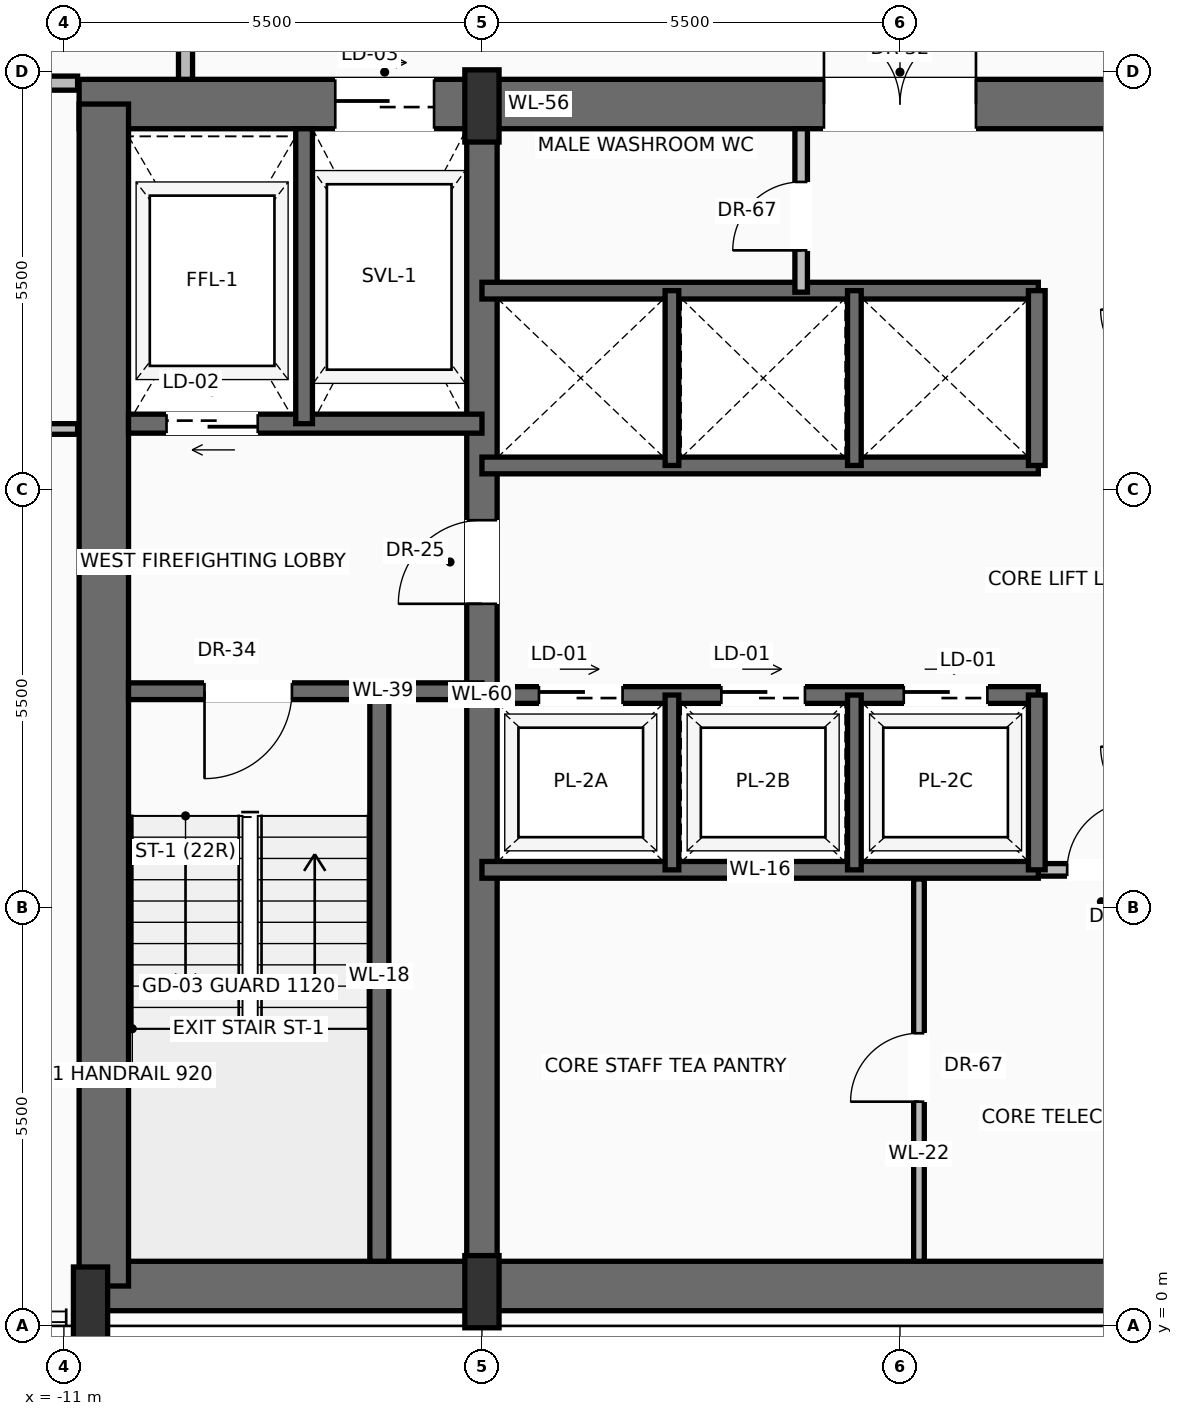
"""IFC4 building model, lengths in metres.
Left out: names, types, materials, properties, quantities, classifications, styles, units other than length and angle.
Written with IfcOpenShell. Run it as: python <this file> out.ifc"""

import sys

from ifc_helpers import new_model, si_unit, direction, frame, frame_2d, origin, origin_2d, place, context, subcontext, project, spatial, rectangle, extrude, source, transform, mapped, element, fill, save


model = new_model("IFC4")
c1 = context("Model", 3, precision=1e-05, world=origin(), true_north=direction((0.0, 1.0)))
c2 = subcontext(c1, "Body", "Model", "MODEL_VIEW")
j1 = project(units=[si_unit("LENGTHUNIT", "METRE"), si_unit("PLANEANGLEUNIT", "RADIAN")], contexts=[c1])
p1 = place(None, origin())
s1 = spatial("IfcSite", under=j1, at=p1, CompositionType="ELEMENT")
p2 = place(p1, origin())
s2 = spatial("IfcBuilding", under=s1, at=p2, CompositionType="ELEMENT")
p3 = place(p2, frame((0.0, 0.0, 140.4)))
s3 = spatial("IfcBuildingStorey", under=s2, at=p3, CompositionType="ELEMENT", Elevation=140.4)
p4 = place(p3, frame((-10.65, 0.525, 0.0), z_axis=(0.0, 0.0, 1.0), x_axis=(1.0, 0.0, 0.0)))
e1 = element("IfcWall", 1, at=p4, inside=s3, PredefinedType="SHEAR", context=c2, shape_type="SweptSolid", body=[
    extrude(rectangle(XDim=21.3, YDim=0.65, at=frame_2d((10.65, 0.0))), origin(), (0.0, 0.0, 1.0), 3.47),
])
p5 = place(p3, frame((-10.8, 16.075, 0.0), z_axis=(0.0, 0.0, 1.0), x_axis=(1.0, 0.0, 0.0)))
e2 = element("IfcWall", 2, at=p5, inside=s3, PredefinedType="SHEAR", context=c2, shape_type="SweptSolid", body=[
    extrude(rectangle(XDim=21.6, YDim=0.65, at=frame_2d((10.8, 0.0))), origin(), (0.0, 0.0, 1.0), 3.47),
])
p6 = place(p5, frame((3.37, 0.0, 0.0)))
e3 = element("IfcOpeningElement", 3, at=p6, cuts=e2, PredefinedType="OPENING", context=c2, shape_type="SweptSolid", body=[
    extrude(rectangle(XDim=1.3, YDim=2.3, at=frame_2d((0.65, 1.15))), frame((0.0, 0.335, 0.0), z_axis=(0.0, -1.0, 0.0), x_axis=(1.0, 0.0, 0.0)), (0.0, 0.0, 1.0), 0.67),
])
p7 = place(p5, frame((9.8, 0.0, 0.0)))
e4 = element("IfcOpeningElement", 4, at=p7, cuts=e2, PredefinedType="OPENING", context=c2, shape_type="SweptSolid", body=[
    extrude(rectangle(XDim=2.0, YDim=2.4, at=frame_2d((1.0, 1.2))), frame((0.0, 0.335, 0.0), z_axis=(0.0, -1.0, 0.0), x_axis=(1.0, 0.0, 0.0)), (0.0, 0.0, 1.0), 0.67),
])
p8 = place(p3, frame((-10.475, 0.525, 0.0), z_axis=(0.0, 0.0, 1.0), x_axis=(0.0, 1.0, 0.0)))
e5 = element("IfcWall", 5, at=p8, inside=s3, PredefinedType="SHEAR", context=c2, shape_type="SweptSolid", body=[
    extrude(rectangle(XDim=15.55, YDim=0.65, at=frame_2d((7.775, 0.0))), origin(), (0.0, 0.0, 1.0), 3.47),
])
p9 = place(p3, frame((-5.5, 0.525, 0.0), z_axis=(0.0, 0.0, 1.0), x_axis=(0.0, 1.0, 0.0)))
e6 = element("IfcWall", 6, at=p9, inside=s3, PredefinedType="SHEAR", context=c2, shape_type="SweptSolid", body=[
    extrude(rectangle(XDim=15.55, YDim=0.4, at=frame_2d((7.775, 0.0))), origin(), (0.0, 0.0, 1.0), 3.47),
])
p10 = place(p9, frame((8.975, 0.0, 0.0)))
e7 = element("IfcOpeningElement", 7, at=p10, cuts=e6, PredefinedType="OPENING", context=c2, shape_type="SweptSolid", body=[
    extrude(rectangle(XDim=1.1, YDim=2.2, at=frame_2d((0.55, 1.1))), frame((0.0, 0.21, 0.0), z_axis=(0.0, -1.0, 0.0), x_axis=(1.0, 0.0, 0.0)), (0.0, 0.0, 1.0), 0.42),
])
m1 = source(origin(), c2, "Body", "SweptSolid", [
    extrude(rectangle(XDim=0.45, YDim=0.95, at=origin_2d()), origin(), (0.0, 0.0, 1.0), 3.7),
])
for number, where, z_axis, x_axis in (
    (8, (-10.65, 0.3, 0.0), (0.0, 0.0, 1.0), (1.0, 0.0, 0.0)),
    (9, (-5.5, 0.45, 0.0), (0.0, 0.0, 1.0), (1.0, 0.0, 0.0)),
    (10, (-5.5, 16.05, 0.0), (0.0, 0.0, 1.0), (1.0, 0.0, 0.0)),
):
    element("IfcColumn", number, at=place(p3, frame(where, z_axis=z_axis, x_axis=x_axis)), inside=s3, PredefinedType="PILASTER", context=c2, shape_type="MappedRepresentation", body=[
        mapped(m1, transform((0.0, 0.0, 0.0), scale=1.0)),
    ])
p11 = place(p3, frame((-6.85, 0.85, 0.0), z_axis=(0.0, 0.0, 1.0), x_axis=(0.0, 1.0, 0.0)))
e11 = element("IfcWall", 11, at=p11, inside=s3, PredefinedType="SOLIDWALL", context=c2, shape_type="SweptSolid", body=[
    extrude(rectangle(XDim=7.5, YDim=0.25, at=frame_2d((3.75, 0.0))), origin(), (0.0, 0.0, 1.0), 3.47),
])
p12 = place(p3, frame((-5.5, 8.35, 0.0), z_axis=(0.0, 0.0, 1.0), x_axis=(-1.0, 0.0, 0.0)))
e12 = element("IfcWall", 12, at=p12, inside=s3, PredefinedType="SOLIDWALL", context=c2, shape_type="SweptSolid", body=[
    extrude(rectangle(XDim=4.65, YDim=0.22, at=frame_2d((2.325, 0.0))), origin(), (0.0, 0.0, 1.0), 3.47),
])
p13 = place(p12, frame((2.5, 0.0, 0.0)))
e13 = element("IfcOpeningElement", 13, at=p13, cuts=e12, PredefinedType="OPENING", context=c2, shape_type="SweptSolid", body=[
    extrude(rectangle(XDim=1.15, YDim=2.2, at=frame_2d((0.575, 1.1))), frame((0.0, 0.12, 0.0), z_axis=(0.0, -1.0, 0.0), x_axis=(1.0, 0.0, 0.0)), (0.0, 0.0, 1.0), 0.24),
])
p14 = place(p3, frame((-5.5, 11.87, 0.0), z_axis=(0.0, 0.0, 1.0), x_axis=(-1.0, 0.0, 0.0)))
e14 = element("IfcWall", 14, at=p14, inside=s3, PredefinedType="SOLIDWALL", context=c2, shape_type="SweptSolid", body=[
    extrude(rectangle(XDim=4.65, YDim=0.25, at=frame_2d((2.325, 0.0))), origin(), (0.0, 0.0, 1.0), 3.47),
])
p15 = place(p14, frame((2.95, 0.0, 0.0)))
e15 = element("IfcOpeningElement", 15, at=p15, cuts=e14, PredefinedType="OPENING", context=c2, shape_type="SweptSolid", body=[
    extrude(rectangle(XDim=1.2, YDim=2.25, at=frame_2d((0.6, 1.125))), frame((0.0, 0.135, 0.0), z_axis=(0.0, -1.0, 0.0), x_axis=(1.0, 0.0, 0.0)), (0.0, 0.0, 1.0), 0.27),
])
p16 = place(p3, frame((-7.84, 11.87, 0.0), z_axis=(0.0, 0.0, 1.0), x_axis=(0.0, 1.0, 0.0)))
e16 = element("IfcWall", 16, at=p16, inside=s3, PredefinedType="SOLIDWALL", context=c2, shape_type="SweptSolid", body=[
    extrude(rectangle(XDim=3.88, YDim=0.22, at=frame_2d((1.94, 0.0))), origin(), (0.0, 0.0, 1.0), 3.47),
])
p17 = place(p3, frame((1.82, 6.0, 0.0), z_axis=(0.0, 0.0, 1.0), x_axis=(1.0, 0.0, 0.0)))
e17 = element("IfcWall", 17, at=p17, inside=s3, PredefinedType="PARTITIONING", context=c2, shape_type="SweptSolid", body=[
    extrude(rectangle(XDim=3.48, YDim=0.165, at=frame_2d((1.74, 0.0))), origin(), (0.0, 0.0, 1.0), 3.462),
])
p18 = place(p17, frame((0.38, 0.0, 0.0)))
e18 = element("IfcOpeningElement", 18, at=p18, cuts=e17, PredefinedType="OPENING", context=c2, shape_type="SweptSolid", body=[
    extrude(rectangle(XDim=0.9, YDim=2.1, at=frame_2d((0.45, 1.05))), frame((0.0, 0.093, 0.0), z_axis=(0.0, -1.0, 0.0), x_axis=(1.0, 0.0, 0.0)), (0.0, 0.0, 1.0), 0.185),
])
p19 = place(p3, frame((0.25, 0.85, 0.0), z_axis=(0.0, 0.0, 1.0), x_axis=(0.0, 1.0, 0.0)))
e19 = element("IfcWall", 19, at=p19, inside=s3, PredefinedType="PARTITIONING", context=c2, shape_type="SweptSolid", body=[
    extrude(rectangle(XDim=5.03, YDim=0.14, at=frame_2d((2.515, 0.0))), origin(), (0.0, 0.0, 1.0), 3.462),
])
p20 = place(p19, frame((2.1, 0.0, 0.0)))
e20 = element("IfcOpeningElement", 20, at=p20, cuts=e19, PredefinedType="OPENING", context=c2, shape_type="SweptSolid", body=[
    extrude(rectangle(XDim=0.9, YDim=2.1, at=frame_2d((0.45, 1.05))), frame((0.0, 0.08, 0.0), z_axis=(0.0, -1.0, 0.0), x_axis=(1.0, 0.0, 0.0)), (0.0, 0.0, 1.0), 0.16),
])
p21 = place(p3, frame((-5.5, 6.0, 0.0), z_axis=(0.0, 0.0, 1.0), x_axis=(1.0, 0.0, 0.0)))
e21 = element("IfcWall", 21, at=p21, inside=s3, PredefinedType="SOLIDWALL", context=c2, shape_type="SweptSolid", body=[
    extrude(rectangle(XDim=7.32, YDim=0.22, at=frame_2d((3.66, 0.0))), origin(), (0.0, 0.0, 1.0), 3.47),
])
p22 = place(p3, frame((-5.5, 8.3, 0.0), z_axis=(0.0, 0.0, 1.0), x_axis=(1.0, 0.0, 0.0)))
e22 = element("IfcWall", 22, at=p22, inside=s3, PredefinedType="SOLIDWALL", context=c2, shape_type="SweptSolid", body=[
    extrude(rectangle(XDim=7.32, YDim=0.22, at=frame_2d((3.66, 0.0))), origin(), (0.0, 0.0, 1.0), 3.47),
])
p23 = place(p22, frame((0.75, 0.0, 0.0)))
e23 = element("IfcOpeningElement", 23, at=p23, cuts=e22, PredefinedType="OPENING", context=c2, shape_type="SweptSolid", body=[
    extrude(rectangle(XDim=1.1, YDim=2.2, at=frame_2d((0.55, 1.1))), frame((0.0, 0.12, 0.0), z_axis=(0.0, -1.0, 0.0), x_axis=(1.0, 0.0, 0.0)), (0.0, 0.0, 1.0), 0.24),
])
p24 = place(p22, frame((3.15, 0.0, 0.0)))
e24 = element("IfcOpeningElement", 24, at=p24, cuts=e22, PredefinedType="OPENING", context=c2, shape_type="SweptSolid", body=[
    extrude(rectangle(XDim=1.1, YDim=2.2, at=frame_2d((0.55, 1.1))), frame((0.0, 0.12, 0.0), z_axis=(0.0, -1.0, 0.0), x_axis=(1.0, 0.0, 0.0)), (0.0, 0.0, 1.0), 0.24),
])
p25 = place(p22, frame((5.55, 0.0, 0.0)))
e25 = element("IfcOpeningElement", 25, at=p25, cuts=e22, PredefinedType="OPENING", context=c2, shape_type="SweptSolid", body=[
    extrude(rectangle(XDim=1.1, YDim=2.2, at=frame_2d((0.55, 1.1))), frame((0.0, 0.12, 0.0), z_axis=(0.0, -1.0, 0.0), x_axis=(1.0, 0.0, 0.0)), (0.0, 0.0, 1.0), 0.24),
])
p26 = place(p3, frame((1.8, 6.0, 0.0), z_axis=(0.0, 0.0, 1.0), x_axis=(0.0, 1.0, 0.0)))
e26 = element("IfcWall", 26, at=p26, inside=s3, PredefinedType="SOLIDWALL", context=c2, shape_type="SweptSolid", body=[
    extrude(rectangle(XDim=2.3, YDim=0.22, at=frame_2d((1.15, 0.0))), origin(), (0.0, 0.0, 1.0), 3.47),
])
for number, where, z_axis, x_axis in (
    (27, (-3.0, 6.0, 0.0), (0.0, 0.0, 1.0), (0.0, 1.0, 0.0)),
    (28, (-0.6, 6.0, 0.0), (0.0, 0.0, 1.0), (0.0, 1.0, 0.0)),
):
    element("IfcWall", number, at=place(p3, frame(where, z_axis=z_axis, x_axis=x_axis)), inside=s3, PredefinedType="SOLIDWALL", context=c2, shape_type="SweptSolid", body=[
        extrude(rectangle(XDim=2.3, YDim=0.18, at=frame_2d((1.15, 0.0))), origin(), (0.0, 0.0, 1.0), 3.47),
    ])
for number, where, z_axis, x_axis in (
    (29, (-5.5, 11.32, 0.0), (0.0, 0.0, 1.0), (1.0, 0.0, 0.0)),
    (30, (-5.5, 13.62, 0.0), (0.0, 0.0, 1.0), (1.0, 0.0, 0.0)),
):
    element("IfcWall", number, at=place(p3, frame(where, z_axis=z_axis, x_axis=x_axis)), inside=s3, PredefinedType="SOLIDWALL", context=c2, shape_type="SweptSolid", body=[
        extrude(rectangle(XDim=7.32, YDim=0.22, at=frame_2d((3.66, 0.0))), origin(), (0.0, 0.0, 1.0), 3.47),
    ])
p27 = place(p3, frame((1.8, 11.32, 0.0), z_axis=(0.0, 0.0, 1.0), x_axis=(0.0, 1.0, 0.0)))
e31 = element("IfcWall", 31, at=p27, inside=s3, PredefinedType="SOLIDWALL", context=c2, shape_type="SweptSolid", body=[
    extrude(rectangle(XDim=2.3, YDim=0.22, at=frame_2d((1.15, 0.0))), origin(), (0.0, 0.0, 1.0), 3.47),
])
for number, where, z_axis, x_axis in (
    (32, (-3.0, 11.32, 0.0), (0.0, 0.0, 1.0), (0.0, 1.0, 0.0)),
    (33, (-0.6, 11.32, 0.0), (0.0, 0.0, 1.0), (0.0, 1.0, 0.0)),
):
    element("IfcWall", number, at=place(p3, frame(where, z_axis=z_axis, x_axis=x_axis)), inside=s3, PredefinedType="SOLIDWALL", context=c2, shape_type="SweptSolid", body=[
        extrude(rectangle(XDim=2.3, YDim=0.18, at=frame_2d((1.15, 0.0))), origin(), (0.0, 0.0, 1.0), 3.47),
    ])
p28 = place(p3, frame((-1.3, 13.6, 0.0), z_axis=(0.0, 0.0, 1.0), x_axis=(0.0, 1.0, 0.0)))
e34 = element("IfcWall", 34, at=p28, inside=s3, PredefinedType="PARTITIONING", context=c2, shape_type="SweptSolid", body=[
    extrude(rectangle(XDim=2.15, YDim=0.165, at=frame_2d((1.075, 0.0))), origin(), (0.0, 0.0, 1.0), 3.462),
])
p29 = place(p28, frame((0.55, 0.0, 0.0)))
e35 = element("IfcOpeningElement", 35, at=p29, cuts=e34, PredefinedType="OPENING", context=c2, shape_type="SweptSolid", body=[
    extrude(rectangle(XDim=0.9, YDim=2.1, at=frame_2d((0.45, 1.05))), frame((0.0, 0.093, 0.0), z_axis=(0.0, -1.0, 0.0), x_axis=(1.0, 0.0, 0.0)), (0.0, 0.0, 1.0), 0.185),
])
p30 = place(p3, frame((-9.4, 16.4, 0.0), z_axis=(0.0, 0.0, 1.0), x_axis=(0.0, 1.0, 0.0)))
e36 = element("IfcWall", 36, at=p30, inside=s3, PredefinedType="PARTITIONING", context=c2, shape_type="SweptSolid", body=[
    extrude(rectangle(XDim=7.2, YDim=0.185, at=frame_2d((3.6, 0.0))), origin(), (0.0, 0.0, 1.0), 3.462),
])
p31 = place(p30, frame((2.546, 0.0, 0.0)))
e37 = element("IfcOpeningElement", 37, at=p31, cuts=e36, PredefinedType="OPENING", context=c2, shape_type="SweptSolid", body=[
    extrude(rectangle(XDim=0.95, YDim=2.2, at=frame_2d((0.475, 1.1))), frame((0.0, 0.103, 0.0), z_axis=(0.0, -1.0, 0.0), x_axis=(1.0, 0.0, 0.0)), (0.0, 0.0, 1.0), 0.205),
])
p32 = place(p3, frame((-21.675, 16.35, 0.0), z_axis=(0.0, 0.0, 1.0), x_axis=(1.0, 0.0, 0.0)))
e38 = element("IfcWall", 38, at=p32, inside=s3, PredefinedType="PARTITIONING", context=c2, shape_type="SweptSolid", body=[
    extrude(rectangle(XDim=10.855, YDim=0.185, at=frame_2d((5.428, 0.0))), origin(), (0.0, 0.0, 1.0), 3.462),
])
p33 = place(p32, frame((6.479, 0.0, 0.0)))
e39 = element("IfcOpeningElement", 39, at=p33, cuts=e38, PredefinedType="OPENING", context=c2, shape_type="SweptSolid", body=[
    extrude(rectangle(XDim=0.95, YDim=2.2, at=frame_2d((0.475, 1.1))), frame((0.0, 0.103, 0.0), z_axis=(0.0, -1.0, 0.0), x_axis=(1.0, 0.0, 0.0)), (0.0, 0.0, 1.0), 0.205),
])
p34 = place(p3, frame((-24.636, 11.8, 0.0), z_axis=(0.0, 0.0, 1.0), x_axis=(1.0, 0.0, 0.0)))
e40 = element("IfcWall", 40, at=p34, inside=s3, PredefinedType="PARTITIONING", context=c2, shape_type="SweptSolid", body=[
    extrude(rectangle(XDim=13.816, YDim=0.14, at=frame_2d((6.908, 0.0))), origin(), (0.0, 0.0, 1.0), 3.462),
])
p35 = place(p34, frame((6.442, 0.0, 0.0)))
e41 = element("IfcOpeningElement", 41, at=p35, cuts=e40, PredefinedType="OPENING", context=c2, shape_type="SweptSolid", body=[
    extrude(rectangle(XDim=0.95, YDim=2.2, at=frame_2d((0.475, 1.1))), frame((0.0, 0.08, 0.0), z_axis=(0.0, -1.0, 0.0), x_axis=(1.0, 0.0, 0.0)), (0.0, 0.0, 1.0), 0.16),
])
m2 = source(origin(), c2, "Body", "SweptSolid", [
    extrude(rectangle(XDim=1.15, YDim=2.2, at=frame_2d((0.575, 1.1))), frame((0.0, 0.025, 0.0), z_axis=(0.0, -1.0, 0.0), x_axis=(1.0, 0.0, 0.0)), (0.0, 0.0, 1.0), 0.05),
])
p36 = place(p13, origin())
e42 = element("IfcDoor", 42, at=p36, inside=s3, OperationType="SINGLE_SWING_RIGHT", PredefinedType="DOOR", context=c2, shape_type="MappedRepresentation", body=[
    mapped(m2, transform((0.0, 0.0, 0.0), scale=1.0)),
])
fill(e13, e42)
m3 = source(origin(), c2, "Body", "SweptSolid", [
    extrude(rectangle(XDim=1.1, YDim=2.2, at=frame_2d((0.55, 1.1))), frame((0.0, 0.025, 0.0), z_axis=(0.0, -1.0, 0.0), x_axis=(1.0, 0.0, 0.0)), (0.0, 0.0, 1.0), 0.05),
])
p37 = place(p10, origin())
e43 = element("IfcDoor", 43, at=p37, inside=s3, OperationType="SINGLE_SWING_LEFT", PredefinedType="DOOR", context=c2, shape_type="MappedRepresentation", body=[
    mapped(m3, transform((0.0, 0.0, 0.0), scale=1.0)),
])
fill(e7, e43)
m4 = source(origin(), c2, "Body", "SweptSolid", [
    extrude(rectangle(XDim=1.2, YDim=2.25, at=frame_2d((0.6, 1.125))), frame((0.0, 0.025, 0.0), z_axis=(0.0, -1.0, 0.0), x_axis=(1.0, 0.0, 0.0)), (0.0, 0.0, 1.0), 0.05),
])
p38 = place(p15, origin())
e44 = element("IfcDoor", 44, at=p38, inside=s3, OperationType="SLIDING_TO_LEFT", PredefinedType="DOOR", context=c2, shape_type="MappedRepresentation", body=[
    mapped(m4, transform((0.0, 0.0, 0.0), scale=1.0)),
])
fill(e15, e44)
m5 = source(origin(), c2, "Body", "SweptSolid", [
    extrude(rectangle(XDim=1.3, YDim=2.3, at=frame_2d((0.65, 1.15))), frame((0.0, 0.025, 0.0), z_axis=(0.0, -1.0, 0.0), x_axis=(1.0, 0.0, 0.0)), (0.0, 0.0, 1.0), 0.05),
])
p39 = place(p6, origin())
e45 = element("IfcDoor", 45, at=p39, inside=s3, OperationType="SLIDING_TO_RIGHT", PredefinedType="DOOR", context=c2, shape_type="MappedRepresentation", body=[
    mapped(m5, transform((0.0, 0.0, 0.0), scale=1.0)),
])
fill(e3, e45)
m6 = source(origin(), c2, "Body", "SweptSolid", [
    extrude(rectangle(XDim=2.0, YDim=2.4, at=frame_2d((1.0, 1.2))), frame((0.0, 0.025, 0.0), z_axis=(0.0, -1.0, 0.0), x_axis=(1.0, 0.0, 0.0)), (0.0, 0.0, 1.0), 0.05),
])
p40 = place(p7, origin())
e46 = element("IfcDoor", 46, at=p40, inside=s3, OperationType="DOUBLE_DOOR_SINGLE_SWING", PredefinedType="DOOR", context=c2, shape_type="MappedRepresentation", body=[
    mapped(m6, transform((0.0, 0.0, 0.0), scale=1.0)),
])
fill(e4, e46)
m7 = source(origin(), c2, "Body", "SweptSolid", [
    extrude(rectangle(XDim=0.9, YDim=2.1, at=frame_2d((0.45, 1.05))), frame((0.0, 0.025, 0.0), z_axis=(0.0, -1.0, 0.0), x_axis=(1.0, 0.0, 0.0)), (0.0, 0.0, 1.0), 0.05),
])
p41 = place(p18, origin())
e47 = element("IfcDoor", 47, at=p41, inside=s3, OperationType="SINGLE_SWING_RIGHT", PredefinedType="DOOR", context=c2, shape_type="MappedRepresentation", body=[
    mapped(m7, transform((0.0, 0.0, 0.0), scale=1.0)),
])
fill(e18, e47)
p42 = place(p20, origin())
e48 = element("IfcDoor", 48, at=p42, inside=s3, OperationType="SINGLE_SWING_LEFT", PredefinedType="DOOR", context=c2, shape_type="MappedRepresentation", body=[
    mapped(m7, transform((0.0, 0.0, 0.0), scale=1.0)),
])
fill(e20, e48)
m8 = source(origin(), c2, "Body", "SweptSolid", [
    extrude(rectangle(XDim=1.1, YDim=2.2, at=frame_2d((0.55, 1.1))), frame((0.0, 0.025, 0.0), z_axis=(0.0, -1.0, 0.0), x_axis=(1.0, 0.0, 0.0)), (0.0, 0.0, 1.0), 0.05),
])
p43 = place(p23, origin())
e49 = element("IfcDoor", 49, at=p43, inside=s3, OperationType="SLIDING_TO_LEFT", PredefinedType="DOOR", context=c2, shape_type="MappedRepresentation", body=[
    mapped(m8, transform((0.0, 0.0, 0.0), scale=1.0)),
])
fill(e23, e49)
p44 = place(p24, origin())
e50 = element("IfcDoor", 50, at=p44, inside=s3, OperationType="SLIDING_TO_LEFT", PredefinedType="DOOR", context=c2, shape_type="MappedRepresentation", body=[
    mapped(m8, transform((0.0, 0.0, 0.0), scale=1.0)),
])
fill(e24, e50)
p45 = place(p25, origin())
e51 = element("IfcDoor", 51, at=p45, inside=s3, OperationType="SLIDING_TO_LEFT", PredefinedType="DOOR", context=c2, shape_type="MappedRepresentation", body=[
    mapped(m8, transform((0.0, 0.0, 0.0), scale=1.0)),
])
fill(e25, e51)
p46 = place(p29, origin())
e52 = element("IfcDoor", 52, at=p46, inside=s3, OperationType="SINGLE_SWING_LEFT", PredefinedType="DOOR", context=c2, shape_type="MappedRepresentation", body=[
    mapped(m7, transform((0.0, 0.0, 0.0), scale=1.0)),
])
fill(e35, e52)
save(model, sys.argv[1])
